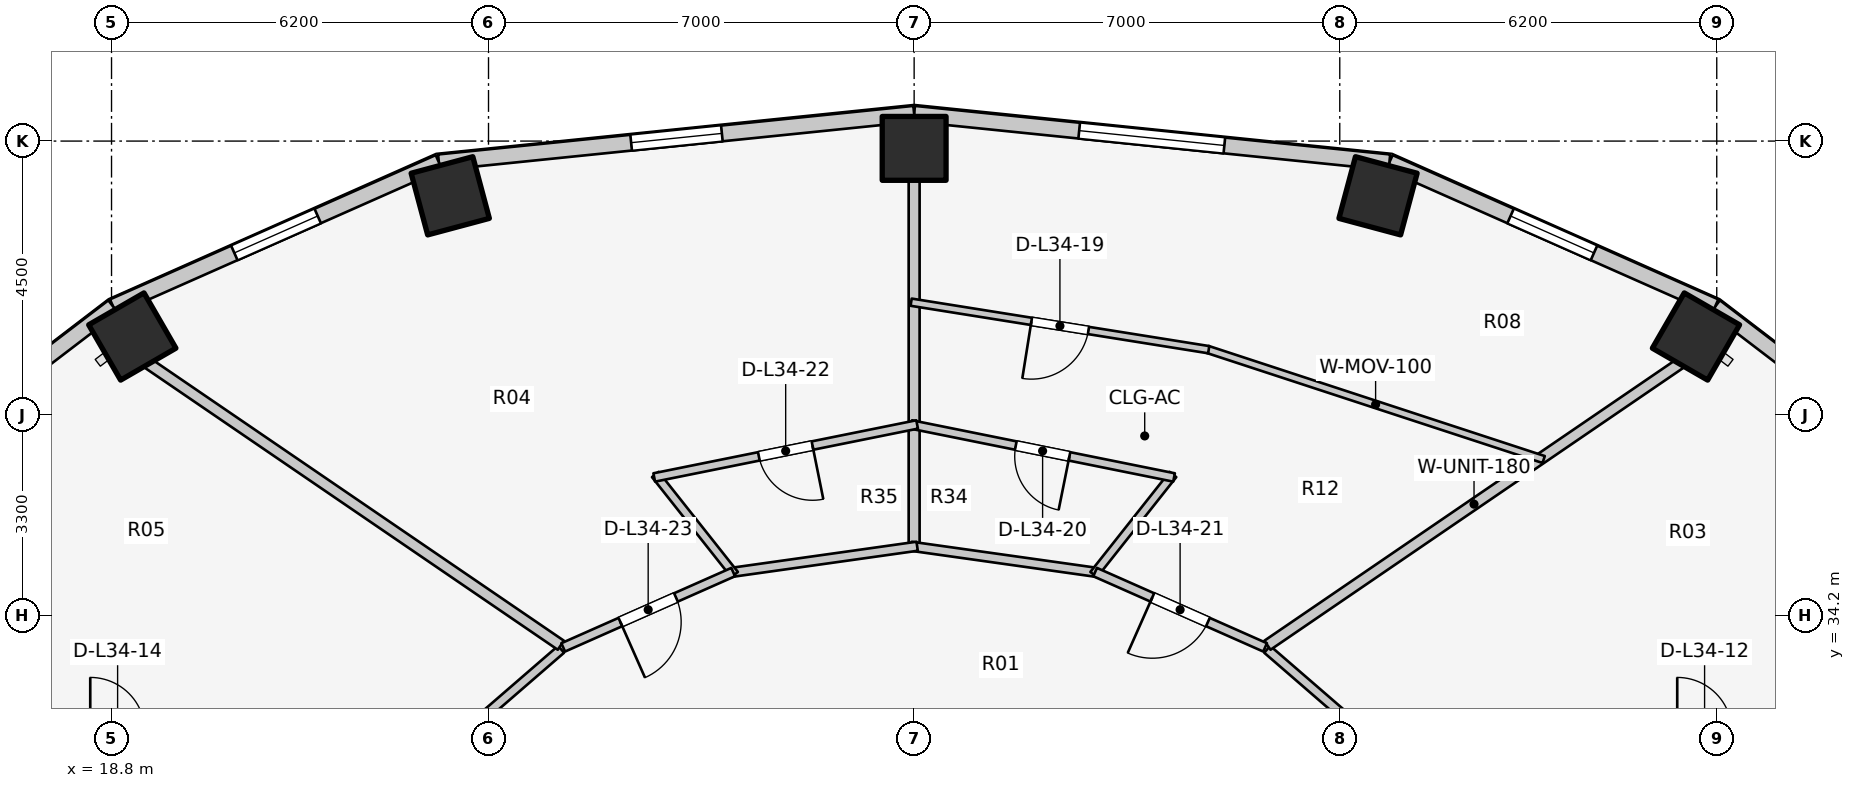
"""IFC4 building model, lengths in metres.
Left out: names, types, materials, properties, quantities, classifications, styles, units other than length and angle.
Written with IfcOpenShell. Run it as: python <this file> out.ifc"""

import sys

from ifc_helpers import new_model, si_unit, direction, frame, frame_2d, origin, origin_2d, place, context, subcontext, project, spatial, rectangle, extrude, element, fill, save


model = new_model("IFC4")
c1 = context("Model", 3, precision=1e-05, world=origin(), true_north=direction((0.0, 1.0)))
c2 = subcontext(c1, "Body", "Model", "MODEL_VIEW")
j1 = project(units=[si_unit("LENGTHUNIT", "METRE"), si_unit("PLANEANGLEUNIT", "RADIAN")], contexts=[c1])
p1 = place(None, origin())
s1 = spatial("IfcSite", under=j1, at=p1, CompositionType="ELEMENT")
p2 = place(p1, origin())
s2 = spatial("IfcBuilding", under=s1, at=p2, CompositionType="ELEMENT")
p3 = place(p2, frame((0.0, 0.0, 113.5)))
s3 = spatial("IfcBuildingStorey", under=s2, at=p3, CompositionType="ELEMENT", Elevation=113.5)
for number, where, z_axis, x_axis in (
    (1, (44.858, 38.786, 0.0), (0.0, 0.0, 1.0), (0.5, 0.866, 0.0)),
    (2, (39.629, 41.1, 0.0), (0.0, 0.0, 1.0), (0.259, 0.966, 0.0)),
    (3, (32.0, 41.88, 0.0), (0.0, 0.0, 1.0), (0.0, 1.0, 0.0)),
    (4, (24.371, 41.1, 0.0), (0.0, 0.0, 1.0), (-0.259, 0.966, 0.0)),
    (5, (19.142, 38.786, 0.0), (0.0, 0.0, 1.0), (-0.5, 0.866, 0.0)),
):
    element("IfcColumn", number, at=place(p3, frame(where, z_axis=z_axis, x_axis=x_axis)), inside=s3, PredefinedType="COLUMN", context=c2, shape_type="SweptSolid", body=[
        extrude(rectangle(XDim=1.05, YDim=1.05, at=origin_2d()), origin(), (0.0, 0.0, 1.0), 3.1),
    ])
p4 = place(p3, frame((49.266, 36.153, 0.0), z_axis=(0.0, 0.0, 1.0), x_axis=(-0.794809810864, 0.606858603427, 0.0)))
e6 = element("IfcWall", 6, at=p4, inside=s3, PredefinedType="STANDARD", context=c2, shape_type="SweptSolid", body=[
    extrude(rectangle(XDim=5.149, YDim=0.26, at=frame_2d((2.575, 0.0))), origin(), (0.0, 0.0, 1.0), 2.85),
])
p5 = place(p3, frame((45.173, 39.278, 0.0), z_axis=(0.0, 0.0, 1.0), x_axis=(-0.914336605747, 0.404955023911, 0.0)))
e7 = element("IfcWall", 7, at=p5, inside=s3, PredefinedType="STANDARD", context=c2, shape_type="SweptSolid", body=[
    extrude(rectangle(XDim=5.859, YDim=0.26, at=frame_2d((2.929, 0.0))), origin(), (0.0, 0.0, 1.0), 2.85),
])
p6 = place(p5, frame((2.179, 0.0, 0.75)))
e8 = element("IfcOpeningElement", 8, at=p6, cuts=e7, PredefinedType="OPENING", context=c2, shape_type="SweptSolid", body=[
    extrude(rectangle(XDim=1.5, YDim=1.6, at=frame_2d((0.75, 0.8))), frame((0.0, 0.14, 0.0), z_axis=(0.0, -1.0, 0.0), x_axis=(1.0, 0.0, 0.0)), (0.0, 0.0, 1.0), 0.28),
])
p7 = place(p3, frame((39.816, 41.651, 0.0), z_axis=(0.0, 0.0, 1.0), x_axis=(-0.994821390558, 0.101638579726, 0.0)))
e9 = element("IfcWall", 9, at=p7, inside=s3, PredefinedType="STANDARD", context=c2, shape_type="SweptSolid", body=[
    extrude(rectangle(XDim=7.857, YDim=0.26, at=frame_2d((3.929, 0.0))), origin(), (0.0, 0.0, 1.0), 2.85),
])
p8 = place(p7, frame((2.729, 0.0, 0.75)))
e10 = element("IfcOpeningElement", 10, at=p8, cuts=e9, PredefinedType="OPENING", context=c2, shape_type="SweptSolid", body=[
    extrude(rectangle(XDim=2.4, YDim=1.7, at=frame_2d((1.2, 0.85))), frame((0.0, 0.14, 0.0), z_axis=(0.0, -1.0, 0.0), x_axis=(1.0, 0.0, 0.0)), (0.0, 0.0, 1.0), 0.28),
])
p9 = place(p3, frame((32.0, 42.449, 0.0), z_axis=(0.0, 0.0, 1.0), x_axis=(-0.994821390558, -0.101638579726, 0.0)))
e11 = element("IfcWall", 11, at=p9, inside=s3, PredefinedType="STANDARD", context=c2, shape_type="SweptSolid", body=[
    extrude(rectangle(XDim=7.857, YDim=0.26, at=frame_2d((3.929, 0.0))), origin(), (0.0, 0.0, 1.0), 2.85),
])
p10 = place(p9, frame((3.178, 0.0, 0.75)))
e12 = element("IfcOpeningElement", 12, at=p10, cuts=e11, PredefinedType="OPENING", context=c2, shape_type="SweptSolid", body=[
    extrude(rectangle(XDim=1.5, YDim=1.6, at=frame_2d((0.75, 0.8))), frame((0.0, 0.14, 0.0), z_axis=(0.0, -1.0, 0.0), x_axis=(1.0, 0.0, 0.0)), (0.0, 0.0, 1.0), 0.28),
])
p11 = place(p3, frame((24.184, 41.651, 0.0), z_axis=(0.0, 0.0, 1.0), x_axis=(-0.914336605747, -0.404955023911, 0.0)))
e13 = element("IfcWall", 13, at=p11, inside=s3, PredefinedType="STANDARD", context=c2, shape_type="SweptSolid", body=[
    extrude(rectangle(XDim=5.859, YDim=0.26, at=frame_2d((2.929, 0.0))), origin(), (0.0, 0.0, 1.0), 2.85),
])
p12 = place(p11, frame((2.179, 0.0, 0.75)))
e14 = element("IfcOpeningElement", 14, at=p12, cuts=e13, PredefinedType="OPENING", context=c2, shape_type="SweptSolid", body=[
    extrude(rectangle(XDim=1.5, YDim=1.6, at=frame_2d((0.75, 0.8))), frame((0.0, 0.14, 0.0), z_axis=(0.0, -1.0, 0.0), x_axis=(1.0, 0.0, 0.0)), (0.0, 0.0, 1.0), 0.28),
])
p13 = place(p3, frame((18.827, 39.278, 0.0), z_axis=(0.0, 0.0, 1.0), x_axis=(-0.794809810864, -0.606858603427, 0.0)))
e15 = element("IfcWall", 15, at=p13, inside=s3, PredefinedType="STANDARD", context=c2, shape_type="SweptSolid", body=[
    extrude(rectangle(XDim=5.149, YDim=0.26, at=frame_2d((2.575, 0.0))), origin(), (0.0, 0.0, 1.0), 2.85),
])
for number, where, z_axis, x_axis in (
    (16, (37.807, 33.642, 0.0), (0.0, 0.0, 1.0), (0.756, -0.655, 0.0)),
    (17, (26.193, 33.642, 0.0), (0.0, 0.0, 1.0), (-0.756, -0.655, 0.0)),
):
    element("IfcWall", number, at=place(p3, frame(where, z_axis=z_axis, x_axis=x_axis)), inside=s3, PredefinedType="PARTITIONING", context=c2, shape_type="SweptSolid", body=[
        extrude(rectangle(XDim=2.111, YDim=0.15, at=frame_2d((1.055, 0.0))), origin(), (0.0, 0.0, 1.0), 2.272),
    ])
p14 = place(p3, frame((37.81, 33.709, 0.0), z_axis=(0.0, 0.0, 1.0), x_axis=(0.825850521911, 0.563889098546, 0.0)))
e18 = element("IfcWall", 18, at=p14, inside=s3, PredefinedType="PARTITIONING", context=c2, shape_type="SweptSolid", body=[
    extrude(rectangle(XDim=8.228, YDim=0.18, at=frame_2d((4.114, 0.0))), origin(), (0.0, 0.0, 1.0), 2.272),
])
p15 = place(p3, frame((32.0, 35.385, 0.0), z_axis=(0.0, 0.0, 1.0), x_axis=(0.0, 1.0, 0.0)))
e19 = element("IfcWall", 19, at=p15, inside=s3, PredefinedType="PARTITIONING", context=c2, shape_type="SweptSolid", body=[
    extrude(rectangle(XDim=5.99, YDim=0.18, at=frame_2d((2.995, 0.0))), origin(), (0.0, 0.0, 1.0), 2.272),
])
p16 = place(p3, frame((26.19, 33.709, 0.0), z_axis=(0.0, 0.0, 1.0), x_axis=(-0.825850521911, 0.563889098546, 0.0)))
e20 = element("IfcWall", 20, at=p16, inside=s3, PredefinedType="PARTITIONING", context=c2, shape_type="SweptSolid", body=[
    extrude(rectangle(XDim=8.228, YDim=0.18, at=frame_2d((4.114, 0.0))), origin(), (0.0, 0.0, 1.0), 2.272),
])
p17 = place(p3, frame((42.354, 36.763, 0.0), z_axis=(0.0, 0.0, 1.0), x_axis=(-0.950307315297, 0.311313357396, 0.0)))
e21 = element("IfcWall", 21, at=p17, inside=s3, PredefinedType="MOVABLE", context=c2, shape_type="SweptSolid", body=[
    extrude(rectangle(XDim=5.817, YDim=0.12, at=frame_2d((2.909, 0.0))), origin(), (0.0, 0.0, 1.0), 2.272),
])
p18 = place(p3, frame((36.845, 38.57, 0.0), z_axis=(0.0, 0.0, 1.0), x_axis=(-0.987504798288, 0.157588937929, 0.0)))
e22 = element("IfcWall", 22, at=p18, inside=s3, PredefinedType="MOVABLE", context=c2, shape_type="SweptSolid", body=[
    extrude(rectangle(XDim=4.956, YDim=0.12, at=frame_2d((2.478, 0.0))), origin(), (0.0, 0.0, 1.0), 2.272),
])
p19 = place(p18, frame((2.003, 0.0, 0.0)))
e23 = element("IfcOpeningElement", 23, at=p19, cuts=e22, PredefinedType="OPENING", context=c2, shape_type="SweptSolid", body=[
    extrude(rectangle(XDim=0.95, YDim=2.1, at=frame_2d((0.475, 1.05))), frame((0.0, 0.07, 0.0), z_axis=(0.0, -1.0, 0.0), x_axis=(1.0, 0.0, 0.0)), (0.0, 0.0, 1.0), 0.14),
])
p20 = place(p3, frame((35.034, 34.903, 0.0), z_axis=(0.0, 0.0, 1.0), x_axis=(-0.990234434447, 0.139412211929, 0.0)))
e24 = element("IfcWall", 24, at=p20, inside=s3, PredefinedType="PARTITIONING", context=c2, shape_type="SweptSolid", body=[
    extrude(rectangle(XDim=3.114, YDim=0.15, at=frame_2d((1.557, 0.0))), origin(), (0.0, 0.0, 1.0), 2.272),
])
p21 = place(p3, frame((34.953, 34.871, 0.0), z_axis=(0.0, 0.0, 1.0), x_axis=(0.620702944366, 0.784045824462, 0.0)))
e25 = element("IfcWall", 25, at=p21, inside=s3, PredefinedType="PLUMBINGWALL", context=c2, shape_type="SweptSolid", body=[
    extrude(rectangle(XDim=2.1, YDim=0.14, at=frame_2d((1.05, 0.0))), origin(), (0.0, 0.0, 1.0), 2.385),
])
p22 = place(p3, frame((36.275, 36.468, 0.0), z_axis=(0.0, 0.0, 1.0), x_axis=(-0.980270771279, 0.197659340725, 0.0)))
e26 = element("IfcWall", 26, at=p22, inside=s3, PredefinedType="PLUMBINGWALL", context=c2, shape_type="SweptSolid", body=[
    extrude(rectangle(XDim=4.411, YDim=0.14, at=frame_2d((2.205, 0.0))), origin(), (0.0, 0.0, 1.0), 2.272),
])
p23 = place(p22, frame((1.755, 0.0, 0.0)))
e27 = element("IfcOpeningElement", 27, at=p23, cuts=e26, PredefinedType="OPENING", context=c2, shape_type="SweptSolid", body=[
    extrude(rectangle(XDim=0.9, YDim=2.1, at=frame_2d((0.45, 1.05))), frame((0.0, 0.08, 0.0), z_axis=(0.0, -1.0, 0.0), x_axis=(1.0, 0.0, 0.0)), (0.0, 0.0, 1.0), 0.16),
])
p24 = place(p3, frame((37.772, 33.674, 0.0), z_axis=(0.0, 0.0, 1.0), x_axis=(-0.914324470734, 0.404982422108, 0.0)))
e28 = element("IfcWall", 28, at=p24, inside=s3, PredefinedType="PARTITIONING", context=c2, shape_type="SweptSolid", body=[
    extrude(rectangle(XDim=3.058, YDim=0.15, at=frame_2d((1.529, 0.0))), origin(), (0.0, 0.0, 1.0), 2.272),
])
p25 = place(p24, frame((1.029, 0.0, 0.0)))
e29 = element("IfcOpeningElement", 29, at=p25, cuts=e28, PredefinedType="OPENING", context=c2, shape_type="SweptSolid", body=[
    extrude(rectangle(XDim=1.0, YDim=2.1, at=frame_2d((0.5, 1.05))), frame((0.0, 0.085, 0.0), z_axis=(0.0, -1.0, 0.0), x_axis=(1.0, 0.0, 0.0)), (0.0, 0.0, 1.0), 0.17),
])
p26 = place(p3, frame((32.05, 35.337, 0.0), z_axis=(0.0, 0.0, 1.0), x_axis=(-0.990234434447, -0.139412211929, 0.0)))
e30 = element("IfcWall", 30, at=p26, inside=s3, PredefinedType="PARTITIONING", context=c2, shape_type="SweptSolid", body=[
    extrude(rectangle(XDim=3.114, YDim=0.15, at=frame_2d((1.557, 0.0))), origin(), (0.0, 0.0, 1.0), 2.272),
])
p27 = place(p3, frame((29.047, 34.871, 0.0), z_axis=(0.0, 0.0, 1.0), x_axis=(-0.620702944366, 0.784045824462, 0.0)))
e31 = element("IfcWall", 31, at=p27, inside=s3, PredefinedType="PLUMBINGWALL", context=c2, shape_type="SweptSolid", body=[
    extrude(rectangle(XDim=2.1, YDim=0.14, at=frame_2d((1.05, 0.0))), origin(), (0.0, 0.0, 1.0), 2.385),
])
p28 = place(p3, frame((32.049, 37.34, 0.0), z_axis=(0.0, 0.0, 1.0), x_axis=(-0.980270771279, -0.197659340725, 0.0)))
e32 = element("IfcWall", 32, at=p28, inside=s3, PredefinedType="PLUMBINGWALL", context=c2, shape_type="SweptSolid", body=[
    extrude(rectangle(XDim=4.411, YDim=0.14, at=frame_2d((2.205, 0.0))), origin(), (0.0, 0.0, 1.0), 2.272),
])
p29 = place(p28, frame((1.755, 0.0, 0.0)))
e33 = element("IfcOpeningElement", 33, at=p29, cuts=e32, PredefinedType="OPENING", context=c2, shape_type="SweptSolid", body=[
    extrude(rectangle(XDim=0.9, YDim=2.1, at=frame_2d((0.45, 1.05))), frame((0.0, 0.08, 0.0), z_axis=(0.0, -1.0, 0.0), x_axis=(1.0, 0.0, 0.0)), (0.0, 0.0, 1.0), 0.16),
])
p30 = place(p3, frame((29.024, 34.912, 0.0), z_axis=(0.0, 0.0, 1.0), x_axis=(-0.914324470734, -0.404982422108, 0.0)))
e34 = element("IfcWall", 34, at=p30, inside=s3, PredefinedType="PARTITIONING", context=c2, shape_type="SweptSolid", body=[
    extrude(rectangle(XDim=3.058, YDim=0.15, at=frame_2d((1.529, 0.0))), origin(), (0.0, 0.0, 1.0), 2.272),
])
p31 = place(p30, frame((1.029, 0.0, 0.0)))
e35 = element("IfcOpeningElement", 35, at=p31, cuts=e34, PredefinedType="OPENING", context=c2, shape_type="SweptSolid", body=[
    extrude(rectangle(XDim=1.0, YDim=2.1, at=frame_2d((0.5, 1.05))), frame((0.0, 0.085, 0.0), z_axis=(0.0, -1.0, 0.0), x_axis=(1.0, 0.0, 0.0)), (0.0, 0.0, 1.0), 0.17),
])
p32 = place(p6, origin())
e36 = element("IfcWindow", 36, at=p32, inside=s3, PartitioningType="SINGLE_PANEL", PredefinedType="WINDOW", context=c2, shape_type="SweptSolid", body=[
    extrude(rectangle(XDim=1.5, YDim=1.6, at=frame_2d((0.75, 0.8))), frame((0.0, 0.03, 0.0), z_axis=(0.0, -1.0, 0.0), x_axis=(1.0, 0.0, 0.0)), (0.0, 0.0, 1.0), 0.06),
])
fill(e8, e36)
p33 = place(p8, origin())
e37 = element("IfcWindow", 37, at=p33, inside=s3, PartitioningType="SINGLE_PANEL", PredefinedType="WINDOW", context=c2, shape_type="SweptSolid", body=[
    extrude(rectangle(XDim=2.4, YDim=1.7, at=frame_2d((1.2, 0.85))), frame((0.0, 0.03, 0.0), z_axis=(0.0, -1.0, 0.0), x_axis=(1.0, 0.0, 0.0)), (0.0, 0.0, 1.0), 0.06),
])
fill(e10, e37)
p34 = place(p10, origin())
e38 = element("IfcWindow", 38, at=p34, inside=s3, PartitioningType="SINGLE_PANEL", PredefinedType="WINDOW", context=c2, shape_type="SweptSolid", body=[
    extrude(rectangle(XDim=1.5, YDim=1.6, at=frame_2d((0.75, 0.8))), frame((0.0, 0.03, 0.0), z_axis=(0.0, -1.0, 0.0), x_axis=(1.0, 0.0, 0.0)), (0.0, 0.0, 1.0), 0.06),
])
fill(e12, e38)
p35 = place(p12, origin())
e39 = element("IfcWindow", 39, at=p35, inside=s3, PartitioningType="SINGLE_PANEL", PredefinedType="WINDOW", context=c2, shape_type="SweptSolid", body=[
    extrude(rectangle(XDim=1.5, YDim=1.6, at=frame_2d((0.75, 0.8))), frame((0.0, 0.03, 0.0), z_axis=(0.0, -1.0, 0.0), x_axis=(1.0, 0.0, 0.0)), (0.0, 0.0, 1.0), 0.06),
])
fill(e14, e39)
p36 = place(p19, origin())
e40 = element("IfcDoor", 40, at=p36, inside=s3, OperationType="SINGLE_SWING_RIGHT", PredefinedType="DOOR", context=c2, shape_type="SweptSolid", body=[
    extrude(rectangle(XDim=0.95, YDim=2.1, at=frame_2d((0.475, 1.05))), frame((0.0, 0.025, 0.0), z_axis=(0.0, -1.0, 0.0), x_axis=(1.0, 0.0, 0.0)), (0.0, 0.0, 1.0), 0.05),
])
fill(e23, e40)
p37 = place(p23, origin())
e41 = element("IfcDoor", 41, at=p37, inside=s3, OperationType="SINGLE_SWING_LEFT", PredefinedType="DOOR", context=c2, shape_type="SweptSolid", body=[
    extrude(rectangle(XDim=0.9, YDim=2.1, at=frame_2d((0.45, 1.05))), frame((0.0, 0.025, 0.0), z_axis=(0.0, -1.0, 0.0), x_axis=(1.0, 0.0, 0.0)), (0.0, 0.0, 1.0), 0.05),
])
fill(e27, e41)
p38 = place(p25, origin())
e42 = element("IfcDoor", 42, at=p38, inside=s3, OperationType="SINGLE_SWING_RIGHT", PredefinedType="DOOR", context=c2, shape_type="SweptSolid", body=[
    extrude(rectangle(XDim=1.0, YDim=2.1, at=frame_2d((0.5, 1.05))), frame((0.0, 0.025, 0.0), z_axis=(0.0, -1.0, 0.0), x_axis=(1.0, 0.0, 0.0)), (0.0, 0.0, 1.0), 0.05),
])
fill(e29, e42)
p39 = place(p29, origin())
e43 = element("IfcDoor", 43, at=p39, inside=s3, OperationType="SINGLE_SWING_LEFT", PredefinedType="DOOR", context=c2, shape_type="SweptSolid", body=[
    extrude(rectangle(XDim=0.9, YDim=2.1, at=frame_2d((0.45, 1.05))), frame((0.0, 0.025, 0.0), z_axis=(0.0, -1.0, 0.0), x_axis=(1.0, 0.0, 0.0)), (0.0, 0.0, 1.0), 0.05),
])
fill(e33, e43)
p40 = place(p31, origin())
e44 = element("IfcDoor", 44, at=p40, inside=s3, OperationType="SINGLE_SWING_RIGHT", PredefinedType="DOOR", context=c2, shape_type="SweptSolid", body=[
    extrude(rectangle(XDim=1.0, YDim=2.1, at=frame_2d((0.5, 1.05))), frame((0.0, 0.025, 0.0), z_axis=(0.0, -1.0, 0.0), x_axis=(1.0, 0.0, 0.0)), (0.0, 0.0, 1.0), 0.05),
])
fill(e35, e44)
save(model, sys.argv[1])
